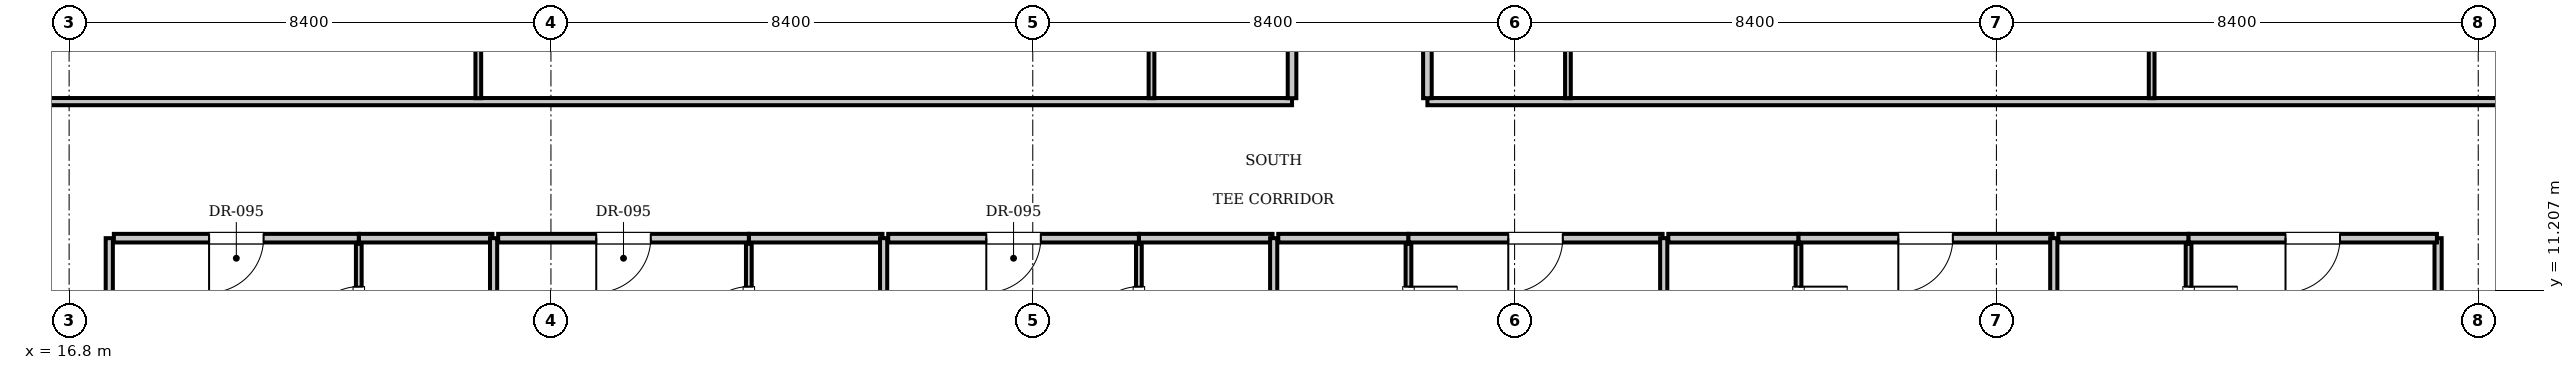
"""IFC4 building model, lengths in metres.
Left out: names, types, materials, properties, quantities, classifications, styles, units other than length and angle.
Written with IfcOpenShell. Run it as: python <this file> out.ifc"""

import sys

from ifc_helpers import new_model, si_unit, direction, frame, frame_2d, origin, place, context, subcontext, project, spatial, rectangle, extrude, element, fill, save


model = new_model("IFC4")
c1 = context("Model", 3, precision=1e-05, world=origin(), true_north=direction((0.0, 1.0)))
c2 = subcontext(c1, "Body", "Model", "MODEL_VIEW")
j1 = project(units=[si_unit("LENGTHUNIT", "METRE"), si_unit("PLANEANGLEUNIT", "RADIAN")], contexts=[c1])
p1 = place(None, origin())
s1 = spatial("IfcSite", under=j1, at=p1, CompositionType="ELEMENT")
p2 = place(p1, origin())
s2 = spatial("IfcBuilding", under=s1, at=p2, CompositionType="ELEMENT")
p3 = place(p2, frame((0.0, 0.0, 158.2)))
s3 = spatial("IfcBuildingStorey", under=s2, at=p3, CompositionType="ELEMENT", Elevation=158.2)
for number, where, z_axis, x_axis in (
    (1, (17.5, 9.0, 0.0), (0.0, 0.0, 1.0), (0.0, 1.0, 0.0)),
    (2, (58.1, 9.0, 0.0), (0.0, 0.0, 1.0), (0.0, 1.0, 0.0)),
):
    element("IfcWall", number, at=place(p3, frame(where, z_axis=z_axis, x_axis=x_axis)), inside=s3, PredefinedType="PARTITIONING", context=c2, shape_type="SweptSolid", body=[
        extrude(rectangle(XDim=3.12, YDim=0.125, at=frame_2d((1.56, 0.0))), origin(), (0.0, 0.0, 1.0), 3.61),
    ])
p4 = place(p3, frame((21.85, 12.12, 0.0), z_axis=(0.0, 0.0, 1.0), x_axis=(1.0, 0.0, 0.0)))
e3 = element("IfcWall", 3, at=p4, inside=s3, PredefinedType="PARTITIONING", context=c2, shape_type="SweptSolid", body=[
    extrude(rectangle(XDim=2.33, YDim=0.15, at=frame_2d((1.165, 0.0))), origin(), (0.0, 0.0, 1.0), 3.61),
])
p5 = place(p3, frame((21.85, 9.68, 0.0), z_axis=(0.0, 0.0, 1.0), x_axis=(0.0, 1.0, 0.0)))
e4 = element("IfcWall", 4, at=p5, inside=s3, PredefinedType="PARTITIONING", context=c2, shape_type="SweptSolid", body=[
    extrude(rectangle(XDim=2.34, YDim=0.1, at=frame_2d((1.17, 0.0))), origin(), (0.0, 0.0, 1.0), 3.61),
])
p6 = place(p5, frame((0.745, 0.0, 0.0)))
e5 = element("IfcOpeningElement", 5, at=p6, cuts=e4, PredefinedType="OPENING", context=c2, shape_type="SweptSolid", body=[
    extrude(rectangle(XDim=0.85, YDim=2.1, at=frame_2d((0.425, 1.05))), frame((0.0, 0.06, 0.0), z_axis=(0.0, -1.0, 0.0), x_axis=(1.0, 0.0, 0.0)), (0.0, 0.0, 1.0), 0.12),
])
p7 = place(p3, frame((17.58, 12.12, 0.0), z_axis=(0.0, 0.0, 1.0), x_axis=(1.0, 0.0, 0.0)))
e6 = element("IfcWall", 6, at=p7, inside=s3, PredefinedType="PARTITIONING", context=c2, shape_type="SweptSolid", body=[
    extrude(rectangle(XDim=4.27, YDim=0.15, at=frame_2d((2.135, 0.0))), origin(), (0.0, 0.0, 1.0), 3.61),
])
p8 = place(p7, frame((1.66, 0.0, 0.0)))
e7 = element("IfcOpeningElement", 7, at=p8, cuts=e6, PredefinedType="OPENING", context=c2, shape_type="SweptSolid", body=[
    extrude(rectangle(XDim=0.95, YDim=2.15, at=frame_2d((0.475, 1.075))), frame((0.0, 0.085, 0.0), z_axis=(0.0, -1.0, 0.0), x_axis=(1.0, 0.0, 0.0)), (0.0, 0.0, 1.0), 0.17),
])
p9 = place(p3, frame((24.2, 4.7, 0.0), z_axis=(0.0, 0.0, 1.0), x_axis=(0.0, 1.0, 0.0)))
e8 = element("IfcWall", 8, at=p9, inside=s3, PredefinedType="PARTITIONING", context=c2, shape_type="SweptSolid", body=[
    extrude(rectangle(XDim=7.42, YDim=0.125, at=frame_2d((3.71, 0.0))), origin(), (0.0, 0.0, 1.0), 3.61),
])
p10 = place(p3, frame((28.65, 12.12, 0.0), z_axis=(0.0, 0.0, 1.0), x_axis=(1.0, 0.0, 0.0)))
e9 = element("IfcWall", 9, at=p10, inside=s3, PredefinedType="PARTITIONING", context=c2, shape_type="SweptSolid", body=[
    extrude(rectangle(XDim=2.33, YDim=0.15, at=frame_2d((1.165, 0.0))), origin(), (0.0, 0.0, 1.0), 3.61),
])
p11 = place(p3, frame((28.65, 9.68, 0.0), z_axis=(0.0, 0.0, 1.0), x_axis=(0.0, 1.0, 0.0)))
e10 = element("IfcWall", 10, at=p11, inside=s3, PredefinedType="PARTITIONING", context=c2, shape_type="SweptSolid", body=[
    extrude(rectangle(XDim=2.34, YDim=0.1, at=frame_2d((1.17, 0.0))), origin(), (0.0, 0.0, 1.0), 3.61),
])
p12 = place(p11, frame((0.745, 0.0, 0.0)))
e11 = element("IfcOpeningElement", 11, at=p12, cuts=e10, PredefinedType="OPENING", context=c2, shape_type="SweptSolid", body=[
    extrude(rectangle(XDim=0.85, YDim=2.1, at=frame_2d((0.425, 1.05))), frame((0.0, 0.06, 0.0), z_axis=(0.0, -1.0, 0.0), x_axis=(1.0, 0.0, 0.0)), (0.0, 0.0, 1.0), 0.12),
])
p13 = place(p3, frame((24.28, 12.12, 0.0), z_axis=(0.0, 0.0, 1.0), x_axis=(1.0, 0.0, 0.0)))
e12 = element("IfcWall", 12, at=p13, inside=s3, PredefinedType="PARTITIONING", context=c2, shape_type="SweptSolid", body=[
    extrude(rectangle(XDim=4.37, YDim=0.15, at=frame_2d((2.185, 0.0))), origin(), (0.0, 0.0, 1.0), 3.61),
])
p14 = place(p13, frame((1.71, 0.0, 0.0)))
e13 = element("IfcOpeningElement", 13, at=p14, cuts=e12, PredefinedType="OPENING", context=c2, shape_type="SweptSolid", body=[
    extrude(rectangle(XDim=0.95, YDim=2.15, at=frame_2d((0.475, 1.075))), frame((0.0, 0.085, 0.0), z_axis=(0.0, -1.0, 0.0), x_axis=(1.0, 0.0, 0.0)), (0.0, 0.0, 1.0), 0.17),
])
p15 = place(p3, frame((31.0, 4.7, 0.0), z_axis=(0.0, 0.0, 1.0), x_axis=(0.0, 1.0, 0.0)))
e14 = element("IfcWall", 14, at=p15, inside=s3, PredefinedType="PARTITIONING", context=c2, shape_type="SweptSolid", body=[
    extrude(rectangle(XDim=7.42, YDim=0.125, at=frame_2d((3.71, 0.0))), origin(), (0.0, 0.0, 1.0), 3.61),
])
p16 = place(p3, frame((35.45, 12.12, 0.0), z_axis=(0.0, 0.0, 1.0), x_axis=(1.0, 0.0, 0.0)))
e15 = element("IfcWall", 15, at=p16, inside=s3, PredefinedType="PARTITIONING", context=c2, shape_type="SweptSolid", body=[
    extrude(rectangle(XDim=2.33, YDim=0.15, at=frame_2d((1.165, 0.0))), origin(), (0.0, 0.0, 1.0), 3.61),
])
p17 = place(p3, frame((35.45, 9.68, 0.0), z_axis=(0.0, 0.0, 1.0), x_axis=(0.0, 1.0, 0.0)))
e16 = element("IfcWall", 16, at=p17, inside=s3, PredefinedType="PARTITIONING", context=c2, shape_type="SweptSolid", body=[
    extrude(rectangle(XDim=2.34, YDim=0.1, at=frame_2d((1.17, 0.0))), origin(), (0.0, 0.0, 1.0), 3.61),
])
p18 = place(p17, frame((0.745, 0.0, 0.0)))
e17 = element("IfcOpeningElement", 17, at=p18, cuts=e16, PredefinedType="OPENING", context=c2, shape_type="SweptSolid", body=[
    extrude(rectangle(XDim=0.85, YDim=2.1, at=frame_2d((0.425, 1.05))), frame((0.0, 0.06, 0.0), z_axis=(0.0, -1.0, 0.0), x_axis=(1.0, 0.0, 0.0)), (0.0, 0.0, 1.0), 0.12),
])
p19 = place(p3, frame((31.08, 12.12, 0.0), z_axis=(0.0, 0.0, 1.0), x_axis=(1.0, 0.0, 0.0)))
e18 = element("IfcWall", 18, at=p19, inside=s3, PredefinedType="PARTITIONING", context=c2, shape_type="SweptSolid", body=[
    extrude(rectangle(XDim=4.37, YDim=0.15, at=frame_2d((2.185, 0.0))), origin(), (0.0, 0.0, 1.0), 3.61),
])
p20 = place(p19, frame((1.71, 0.0, 0.0)))
e19 = element("IfcOpeningElement", 19, at=p20, cuts=e18, PredefinedType="OPENING", context=c2, shape_type="SweptSolid", body=[
    extrude(rectangle(XDim=0.95, YDim=2.15, at=frame_2d((0.475, 1.075))), frame((0.0, 0.085, 0.0), z_axis=(0.0, -1.0, 0.0), x_axis=(1.0, 0.0, 0.0)), (0.0, 0.0, 1.0), 0.17),
])
p21 = place(p3, frame((37.8, 4.7, 0.0), z_axis=(0.0, 0.0, 1.0), x_axis=(0.0, 1.0, 0.0)))
e20 = element("IfcWall", 20, at=p21, inside=s3, PredefinedType="PARTITIONING", context=c2, shape_type="SweptSolid", body=[
    extrude(rectangle(XDim=7.42, YDim=0.125, at=frame_2d((3.71, 0.0))), origin(), (0.0, 0.0, 1.0), 3.344),
])
p22 = place(p3, frame((37.88, 12.12, 0.0), z_axis=(0.0, 0.0, 1.0), x_axis=(1.0, 0.0, 0.0)))
e21 = element("IfcWall", 21, at=p22, inside=s3, PredefinedType="PARTITIONING", context=c2, shape_type="SweptSolid", body=[
    extrude(rectangle(XDim=2.27, YDim=0.15, at=frame_2d((1.135, 0.0))), origin(), (0.0, 0.0, 1.0), 3.61),
])
p23 = place(p3, frame((40.15, 9.68, 0.0), z_axis=(0.0, 0.0, 1.0), x_axis=(0.0, 1.0, 0.0)))
e22 = element("IfcWall", 22, at=p23, inside=s3, PredefinedType="PARTITIONING", context=c2, shape_type="SweptSolid", body=[
    extrude(rectangle(XDim=2.34, YDim=0.1, at=frame_2d((1.17, 0.0))), origin(), (0.0, 0.0, 1.0), 3.61),
])
p24 = place(p23, frame((0.745, 0.0, 0.0)))
e23 = element("IfcOpeningElement", 23, at=p24, cuts=e22, PredefinedType="OPENING", context=c2, shape_type="SweptSolid", body=[
    extrude(rectangle(XDim=0.85, YDim=2.1, at=frame_2d((0.425, 1.05))), frame((0.0, 0.06, 0.0), z_axis=(0.0, -1.0, 0.0), x_axis=(1.0, 0.0, 0.0)), (0.0, 0.0, 1.0), 0.12),
])
p25 = place(p3, frame((40.15, 12.12, 0.0), z_axis=(0.0, 0.0, 1.0), x_axis=(1.0, 0.0, 0.0)))
e24 = element("IfcWall", 24, at=p25, inside=s3, PredefinedType="PARTITIONING", context=c2, shape_type="SweptSolid", body=[
    extrude(rectangle(XDim=4.43, YDim=0.15, at=frame_2d((2.215, 0.0))), origin(), (0.0, 0.0, 1.0), 3.61),
])
p26 = place(p25, frame((1.74, 0.0, 0.0)))
e25 = element("IfcOpeningElement", 25, at=p26, cuts=e24, PredefinedType="OPENING", context=c2, shape_type="SweptSolid", body=[
    extrude(rectangle(XDim=0.95, YDim=2.15, at=frame_2d((0.475, 1.075))), frame((0.0, 0.085, 0.0), z_axis=(0.0, -1.0, 0.0), x_axis=(1.0, 0.0, 0.0)), (0.0, 0.0, 1.0), 0.17),
])
p27 = place(p3, frame((44.6, 4.7, 0.0), z_axis=(0.0, 0.0, 1.0), x_axis=(0.0, 1.0, 0.0)))
e26 = element("IfcWall", 26, at=p27, inside=s3, PredefinedType="PARTITIONING", context=c2, shape_type="SweptSolid", body=[
    extrude(rectangle(XDim=7.42, YDim=0.125, at=frame_2d((3.71, 0.0))), origin(), (0.0, 0.0, 1.0), 3.61),
])
p28 = place(p3, frame((44.68, 12.12, 0.0), z_axis=(0.0, 0.0, 1.0), x_axis=(1.0, 0.0, 0.0)))
e27 = element("IfcWall", 27, at=p28, inside=s3, PredefinedType="PARTITIONING", context=c2, shape_type="SweptSolid", body=[
    extrude(rectangle(XDim=2.27, YDim=0.15, at=frame_2d((1.135, 0.0))), origin(), (0.0, 0.0, 1.0), 3.61),
])
p29 = place(p3, frame((46.95, 9.68, 0.0), z_axis=(0.0, 0.0, 1.0), x_axis=(0.0, 1.0, 0.0)))
e28 = element("IfcWall", 28, at=p29, inside=s3, PredefinedType="PARTITIONING", context=c2, shape_type="SweptSolid", body=[
    extrude(rectangle(XDim=2.34, YDim=0.1, at=frame_2d((1.17, 0.0))), origin(), (0.0, 0.0, 1.0), 3.61),
])
p30 = place(p29, frame((0.745, 0.0, 0.0)))
e29 = element("IfcOpeningElement", 29, at=p30, cuts=e28, PredefinedType="OPENING", context=c2, shape_type="SweptSolid", body=[
    extrude(rectangle(XDim=0.85, YDim=2.1, at=frame_2d((0.425, 1.05))), frame((0.0, 0.06, 0.0), z_axis=(0.0, -1.0, 0.0), x_axis=(1.0, 0.0, 0.0)), (0.0, 0.0, 1.0), 0.12),
])
p31 = place(p3, frame((46.95, 12.12, 0.0), z_axis=(0.0, 0.0, 1.0), x_axis=(1.0, 0.0, 0.0)))
e30 = element("IfcWall", 30, at=p31, inside=s3, PredefinedType="PARTITIONING", context=c2, shape_type="SweptSolid", body=[
    extrude(rectangle(XDim=4.43, YDim=0.15, at=frame_2d((2.215, 0.0))), origin(), (0.0, 0.0, 1.0), 3.61),
])
p32 = place(p31, frame((1.74, 0.0, 0.0)))
e31 = element("IfcOpeningElement", 31, at=p32, cuts=e30, PredefinedType="OPENING", context=c2, shape_type="SweptSolid", body=[
    extrude(rectangle(XDim=0.95, YDim=2.15, at=frame_2d((0.475, 1.075))), frame((0.0, 0.085, 0.0), z_axis=(0.0, -1.0, 0.0), x_axis=(1.0, 0.0, 0.0)), (0.0, 0.0, 1.0), 0.17),
])
p33 = place(p3, frame((51.4, 4.7, 0.0), z_axis=(0.0, 0.0, 1.0), x_axis=(0.0, 1.0, 0.0)))
e32 = element("IfcWall", 32, at=p33, inside=s3, PredefinedType="PARTITIONING", context=c2, shape_type="SweptSolid", body=[
    extrude(rectangle(XDim=7.42, YDim=0.125, at=frame_2d((3.71, 0.0))), origin(), (0.0, 0.0, 1.0), 3.61),
])
p34 = place(p3, frame((51.48, 12.12, 0.0), z_axis=(0.0, 0.0, 1.0), x_axis=(1.0, 0.0, 0.0)))
e33 = element("IfcWall", 33, at=p34, inside=s3, PredefinedType="PARTITIONING", context=c2, shape_type="SweptSolid", body=[
    extrude(rectangle(XDim=2.27, YDim=0.15, at=frame_2d((1.135, 0.0))), origin(), (0.0, 0.0, 1.0), 3.61),
])
p35 = place(p3, frame((53.75, 9.68, 0.0), z_axis=(0.0, 0.0, 1.0), x_axis=(0.0, 1.0, 0.0)))
e34 = element("IfcWall", 34, at=p35, inside=s3, PredefinedType="PARTITIONING", context=c2, shape_type="SweptSolid", body=[
    extrude(rectangle(XDim=2.34, YDim=0.1, at=frame_2d((1.17, 0.0))), origin(), (0.0, 0.0, 1.0), 3.61),
])
p36 = place(p35, frame((0.745, 0.0, 0.0)))
e35 = element("IfcOpeningElement", 35, at=p36, cuts=e34, PredefinedType="OPENING", context=c2, shape_type="SweptSolid", body=[
    extrude(rectangle(XDim=0.85, YDim=2.1, at=frame_2d((0.425, 1.05))), frame((0.0, 0.06, 0.0), z_axis=(0.0, -1.0, 0.0), x_axis=(1.0, 0.0, 0.0)), (0.0, 0.0, 1.0), 0.12),
])
p37 = place(p3, frame((53.75, 12.12, 0.0), z_axis=(0.0, 0.0, 1.0), x_axis=(1.0, 0.0, 0.0)))
e36 = element("IfcWall", 36, at=p37, inside=s3, PredefinedType="PARTITIONING", context=c2, shape_type="SweptSolid", body=[
    extrude(rectangle(XDim=4.33, YDim=0.15, at=frame_2d((2.165, 0.0))), origin(), (0.0, 0.0, 1.0), 3.61),
])
p38 = place(p37, frame((1.69, 0.0, 0.0)))
e37 = element("IfcOpeningElement", 37, at=p38, cuts=e36, PredefinedType="OPENING", context=c2, shape_type="SweptSolid", body=[
    extrude(rectangle(XDim=0.95, YDim=2.15, at=frame_2d((0.475, 1.075))), frame((0.0, 0.085, 0.0), z_axis=(0.0, -1.0, 0.0), x_axis=(1.0, 0.0, 0.0)), (0.0, 0.0, 1.0), 0.17),
])
p39 = place(p3, frame((13.2, 14.5, 0.0), z_axis=(0.0, 0.0, 1.0), x_axis=(1.0, 0.0, 0.0)))
e38 = element("IfcWall", 38, at=p39, inside=s3, PredefinedType="PARTITIONING", context=c2, shape_type="SweptSolid", body=[
    extrude(rectangle(XDim=24.92, YDim=0.125, at=frame_2d((12.46, 0.0))), origin(), (0.0, 0.0, 1.0), 3.61),
])
p40 = place(p3, frame((40.48, 14.5, 0.0), z_axis=(0.0, 0.0, 1.0), x_axis=(1.0, 0.0, 0.0)))
e39 = element("IfcWall", 39, at=p40, inside=s3, PredefinedType="PARTITIONING", context=c2, shape_type="SweptSolid", body=[
    extrude(rectangle(XDim=21.92, YDim=0.125, at=frame_2d((10.96, 0.0))), origin(), (0.0, 0.0, 1.0), 3.61),
])
p41 = place(p3, frame((38.12, 14.56, 0.0), z_axis=(0.0, 0.0, 1.0), x_axis=(0.0, 1.0, 0.0)))
e40 = element("IfcWall", 40, at=p41, inside=s3, PredefinedType="PARTITIONING", context=c2, shape_type="SweptSolid", body=[
    extrude(rectangle(XDim=1.93, YDim=0.15, at=frame_2d((0.965, 0.0))), origin(), (0.0, 0.0, 1.0), 3.61),
])
p42 = place(p3, frame((35.67, 14.56, 0.0), z_axis=(0.0, 0.0, 1.0), x_axis=(0.0, 1.0, 0.0)))
e41 = element("IfcWall", 41, at=p42, inside=s3, PredefinedType="PARTITIONING", context=c2, shape_type="SweptSolid", body=[
    extrude(rectangle(XDim=1.93, YDim=0.1, at=frame_2d((0.965, 0.0))), origin(), (0.0, 0.0, 1.0), 3.61),
])
p43 = place(p3, frame((23.934, 14.56, 0.0), z_axis=(0.0, 0.0, 1.0), x_axis=(0.0, 1.0, 0.0)))
e42 = element("IfcWall", 42, at=p43, inside=s3, PredefinedType="PARTITIONING", context=c2, shape_type="SweptSolid", body=[
    extrude(rectangle(XDim=5.41, YDim=0.1, at=frame_2d((2.705, 0.0))), origin(), (0.0, 0.0, 1.0), 3.61),
])
p44 = place(p43, frame((1.775, 0.0, 0.0)))
e43 = element("IfcOpeningElement", 43, at=p44, cuts=e42, PredefinedType="OPENING", context=c2, shape_type="SweptSolid", body=[
    extrude(rectangle(XDim=0.9, YDim=2.1, at=frame_2d((0.45, 1.05))), frame((0.0, 0.06, 0.0), z_axis=(0.0, -1.0, 0.0), x_axis=(1.0, 0.0, 0.0)), (0.0, 0.0, 1.0), 0.12),
])
p45 = place(p3, frame((40.48, 14.56, 0.0), z_axis=(0.0, 0.0, 1.0), x_axis=(0.0, 1.0, 0.0)))
e44 = element("IfcWall", 44, at=p45, inside=s3, PredefinedType="PARTITIONING", context=c2, shape_type="SweptSolid", body=[
    extrude(rectangle(XDim=1.93, YDim=0.15, at=frame_2d((0.965, 0.0))), origin(), (0.0, 0.0, 1.0), 3.61),
])
p46 = place(p3, frame((42.93, 14.56, 0.0), z_axis=(0.0, 0.0, 1.0), x_axis=(0.0, 1.0, 0.0)))
e45 = element("IfcWall", 45, at=p46, inside=s3, PredefinedType="PARTITIONING", context=c2, shape_type="SweptSolid", body=[
    extrude(rectangle(XDim=1.93, YDim=0.1, at=frame_2d((0.965, 0.0))), origin(), (0.0, 0.0, 1.0), 3.61),
])
p47 = place(p3, frame((53.106, 14.56, 0.0), z_axis=(0.0, 0.0, 1.0), x_axis=(0.0, 1.0, 0.0)))
e46 = element("IfcWall", 46, at=p47, inside=s3, PredefinedType="PARTITIONING", context=c2, shape_type="SweptSolid", body=[
    extrude(rectangle(XDim=5.41, YDim=0.1, at=frame_2d((2.705, 0.0))), origin(), (0.0, 0.0, 1.0), 3.61),
])
p48 = place(p47, frame((2.255, 0.0, 0.0)))
e47 = element("IfcOpeningElement", 47, at=p48, cuts=e46, PredefinedType="OPENING", context=c2, shape_type="SweptSolid", body=[
    extrude(rectangle(XDim=0.9, YDim=2.1, at=frame_2d((0.45, 1.05))), frame((0.0, 0.06, 0.0), z_axis=(0.0, -1.0, 0.0), x_axis=(1.0, 0.0, 0.0)), (0.0, 0.0, 1.0), 0.12),
])
p49 = place(p6, origin())
e48 = element("IfcDoor", 48, at=p49, inside=s3, OperationType="SINGLE_SWING_LEFT", PredefinedType="DOOR", context=c2, shape_type="SweptSolid", body=[
    extrude(rectangle(XDim=0.85, YDim=2.1, at=frame_2d((0.425, 1.05))), frame((0.0, 0.025, 0.0), z_axis=(0.0, -1.0, 0.0), x_axis=(1.0, 0.0, 0.0)), (0.0, 0.0, 1.0), 0.05),
])
fill(e5, e48)
p50 = place(p8, frame((0.95, 0.0, 0.0), z_axis=(0.0, 0.0, 1.0), x_axis=(-1.0, 0.0, 0.0)))
e49 = element("IfcDoor", 49, at=p50, inside=s3, OperationType="SINGLE_SWING_RIGHT", PredefinedType="DOOR", context=c2, shape_type="SweptSolid", body=[
    extrude(rectangle(XDim=0.95, YDim=2.15, at=frame_2d((0.475, 1.075))), frame((0.0, 0.025, 0.0), z_axis=(0.0, -1.0, 0.0), x_axis=(1.0, 0.0, 0.0)), (0.0, 0.0, 1.0), 0.05),
])
fill(e7, e49)
p51 = place(p12, origin())
e50 = element("IfcDoor", 50, at=p51, inside=s3, OperationType="SINGLE_SWING_LEFT", PredefinedType="DOOR", context=c2, shape_type="SweptSolid", body=[
    extrude(rectangle(XDim=0.85, YDim=2.1, at=frame_2d((0.425, 1.05))), frame((0.0, 0.025, 0.0), z_axis=(0.0, -1.0, 0.0), x_axis=(1.0, 0.0, 0.0)), (0.0, 0.0, 1.0), 0.05),
])
fill(e11, e50)
p52 = place(p14, frame((0.95, 0.0, 0.0), z_axis=(0.0, 0.0, 1.0), x_axis=(-1.0, 0.0, 0.0)))
e51 = element("IfcDoor", 51, at=p52, inside=s3, OperationType="SINGLE_SWING_RIGHT", PredefinedType="DOOR", context=c2, shape_type="SweptSolid", body=[
    extrude(rectangle(XDim=0.95, YDim=2.15, at=frame_2d((0.475, 1.075))), frame((0.0, 0.025, 0.0), z_axis=(0.0, -1.0, 0.0), x_axis=(1.0, 0.0, 0.0)), (0.0, 0.0, 1.0), 0.05),
])
fill(e13, e51)
p53 = place(p18, origin())
e52 = element("IfcDoor", 52, at=p53, inside=s3, OperationType="SINGLE_SWING_LEFT", PredefinedType="DOOR", context=c2, shape_type="SweptSolid", body=[
    extrude(rectangle(XDim=0.85, YDim=2.1, at=frame_2d((0.425, 1.05))), frame((0.0, 0.025, 0.0), z_axis=(0.0, -1.0, 0.0), x_axis=(1.0, 0.0, 0.0)), (0.0, 0.0, 1.0), 0.05),
])
fill(e17, e52)
p54 = place(p20, frame((0.95, 0.0, 0.0), z_axis=(0.0, 0.0, 1.0), x_axis=(-1.0, 0.0, 0.0)))
e53 = element("IfcDoor", 53, at=p54, inside=s3, OperationType="SINGLE_SWING_RIGHT", PredefinedType="DOOR", context=c2, shape_type="SweptSolid", body=[
    extrude(rectangle(XDim=0.95, YDim=2.15, at=frame_2d((0.475, 1.075))), frame((0.0, 0.025, 0.0), z_axis=(0.0, -1.0, 0.0), x_axis=(1.0, 0.0, 0.0)), (0.0, 0.0, 1.0), 0.05),
])
fill(e19, e53)
p55 = place(p24, frame((0.85, 0.0, 0.0), z_axis=(0.0, 0.0, 1.0), x_axis=(-1.0, 0.0, 0.0)))
e54 = element("IfcDoor", 54, at=p55, inside=s3, OperationType="SINGLE_SWING_LEFT", PredefinedType="DOOR", context=c2, shape_type="SweptSolid", body=[
    extrude(rectangle(XDim=0.85, YDim=2.1, at=frame_2d((0.425, 1.05))), frame((0.0, 0.025, 0.0), z_axis=(0.0, -1.0, 0.0), x_axis=(1.0, 0.0, 0.0)), (0.0, 0.0, 1.0), 0.05),
])
fill(e23, e54)
p56 = place(p26, frame((0.95, 0.0, 0.0), z_axis=(0.0, 0.0, 1.0), x_axis=(-1.0, 0.0, 0.0)))
e55 = element("IfcDoor", 55, at=p56, inside=s3, OperationType="SINGLE_SWING_RIGHT", PredefinedType="DOOR", context=c2, shape_type="SweptSolid", body=[
    extrude(rectangle(XDim=0.95, YDim=2.15, at=frame_2d((0.475, 1.075))), frame((0.0, 0.025, 0.0), z_axis=(0.0, -1.0, 0.0), x_axis=(1.0, 0.0, 0.0)), (0.0, 0.0, 1.0), 0.05),
])
fill(e25, e55)
p57 = place(p30, frame((0.85, 0.0, 0.0), z_axis=(0.0, 0.0, 1.0), x_axis=(-1.0, 0.0, 0.0)))
e56 = element("IfcDoor", 56, at=p57, inside=s3, OperationType="SINGLE_SWING_LEFT", PredefinedType="DOOR", context=c2, shape_type="SweptSolid", body=[
    extrude(rectangle(XDim=0.85, YDim=2.1, at=frame_2d((0.425, 1.05))), frame((0.0, 0.025, 0.0), z_axis=(0.0, -1.0, 0.0), x_axis=(1.0, 0.0, 0.0)), (0.0, 0.0, 1.0), 0.05),
])
fill(e29, e56)
p58 = place(p32, frame((0.95, 0.0, 0.0), z_axis=(0.0, 0.0, 1.0), x_axis=(-1.0, 0.0, 0.0)))
e57 = element("IfcDoor", 57, at=p58, inside=s3, OperationType="SINGLE_SWING_RIGHT", PredefinedType="DOOR", context=c2, shape_type="SweptSolid", body=[
    extrude(rectangle(XDim=0.95, YDim=2.15, at=frame_2d((0.475, 1.075))), frame((0.0, 0.025, 0.0), z_axis=(0.0, -1.0, 0.0), x_axis=(1.0, 0.0, 0.0)), (0.0, 0.0, 1.0), 0.05),
])
fill(e31, e57)
p59 = place(p36, frame((0.85, 0.0, 0.0), z_axis=(0.0, 0.0, 1.0), x_axis=(-1.0, 0.0, 0.0)))
e58 = element("IfcDoor", 58, at=p59, inside=s3, OperationType="SINGLE_SWING_LEFT", PredefinedType="DOOR", context=c2, shape_type="SweptSolid", body=[
    extrude(rectangle(XDim=0.85, YDim=2.1, at=frame_2d((0.425, 1.05))), frame((0.0, 0.025, 0.0), z_axis=(0.0, -1.0, 0.0), x_axis=(1.0, 0.0, 0.0)), (0.0, 0.0, 1.0), 0.05),
])
fill(e35, e58)
p60 = place(p38, frame((0.95, 0.0, 0.0), z_axis=(0.0, 0.0, 1.0), x_axis=(-1.0, 0.0, 0.0)))
e59 = element("IfcDoor", 59, at=p60, inside=s3, OperationType="SINGLE_SWING_RIGHT", PredefinedType="DOOR", context=c2, shape_type="SweptSolid", body=[
    extrude(rectangle(XDim=0.95, YDim=2.15, at=frame_2d((0.475, 1.075))), frame((0.0, 0.025, 0.0), z_axis=(0.0, -1.0, 0.0), x_axis=(1.0, 0.0, 0.0)), (0.0, 0.0, 1.0), 0.05),
])
fill(e37, e59)
save(model, sys.argv[1])
